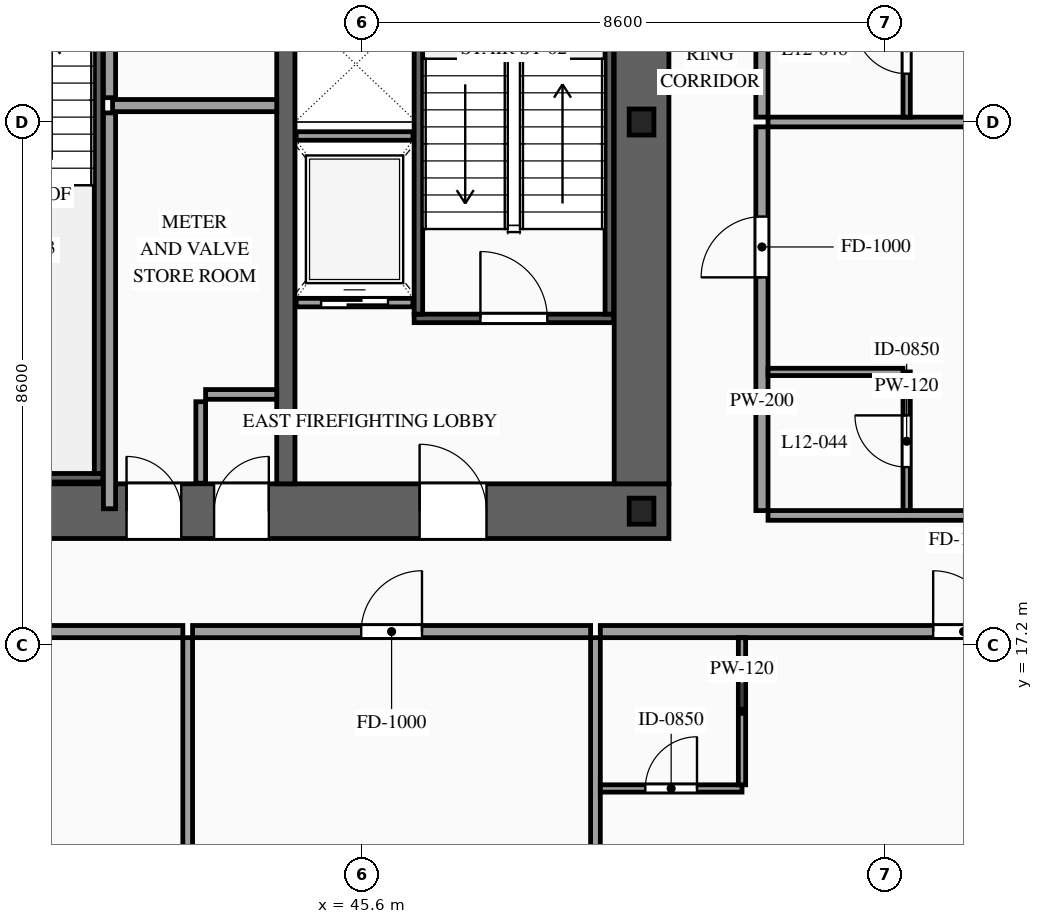
"""IFC4 building model, lengths in metres.
Left out: names, types, materials, properties, quantities, classifications, styles, units other than length and angle.
Written with IfcOpenShell. Run it as: python <this file> out.ifc"""

import sys

from ifc_helpers import new_model, si_unit, direction, frame, frame_2d, origin, origin_2d, place, context, subcontext, project, spatial, rectangle, i_section, extrude, source, transform, mapped, element, fill, save


model = new_model("IFC4")
c1 = context("Model", 3, precision=1e-05, world=origin(), true_north=direction((0.0, 1.0)))
c2 = subcontext(c1, "Body", "Model", "MODEL_VIEW")
j1 = project(units=[si_unit("LENGTHUNIT", "METRE"), si_unit("PLANEANGLEUNIT", "RADIAN")], contexts=[c1])
p1 = place(None, origin())
s1 = spatial("IfcSite", under=j1, at=p1, CompositionType="ELEMENT")
p2 = place(p1, origin())
s2 = spatial("IfcBuilding", under=s1, at=p2, CompositionType="ELEMENT")
p3 = place(p2, frame((0.0, 0.0, 49.6)))
s3 = spatial("IfcBuildingStorey", under=s2, at=p3, CompositionType="ELEMENT", Elevation=49.6)
p4 = place(p3, frame((23.35, 19.4, 0.0), z_axis=(0.0, 0.0, 1.0), x_axis=(1.0, 0.0, 0.0)))
e1 = element("IfcWall", 1, at=p4, inside=s3, PredefinedType="SHEAR", context=c2, shape_type="SweptSolid", body=[
    extrude(rectangle(XDim=27.3, YDim=0.9, at=frame_2d((13.65, 0.0))), origin(), (0.0, 0.0, 1.0), 3.6),
])
p5 = place(p4, frame((2.1, 0.0, 0.0)))
e2 = element("IfcOpeningElement", 2, at=p5, cuts=e1, PredefinedType="OPENING", context=c2, shape_type="SweptSolid", body=[
    extrude(rectangle(XDim=1.1, YDim=2.2, at=frame_2d((0.55, 1.1))), frame((0.0, 0.465, 0.0), z_axis=(0.0, -1.0, 0.0), x_axis=(1.0, 0.0, 0.0)), (0.0, 0.0, 1.0), 0.93),
])
p6 = place(p4, frame((10.0, 0.0, 0.0)))
e3 = element("IfcOpeningElement", 3, at=p6, cuts=e1, PredefinedType="OPENING", context=c2, shape_type="SweptSolid", body=[
    extrude(rectangle(XDim=1.1, YDim=2.2, at=frame_2d((0.55, 1.1))), frame((0.0, 0.465, 0.0), z_axis=(0.0, -1.0, 0.0), x_axis=(1.0, 0.0, 0.0)), (0.0, 0.0, 1.0), 0.93),
])
p7 = place(p4, frame((23.2, 0.0, 0.0)))
e4 = element("IfcOpeningElement", 4, at=p7, cuts=e1, PredefinedType="OPENING", context=c2, shape_type="SweptSolid", body=[
    extrude(rectangle(XDim=1.1, YDim=2.2, at=frame_2d((0.55, 1.1))), frame((0.0, 0.465, 0.0), z_axis=(0.0, -1.0, 0.0), x_axis=(1.0, 0.0, 0.0)), (0.0, 0.0, 1.0), 0.93),
])
p8 = place(p4, frame((19.82, 0.0, 0.0)))
e5 = element("IfcOpeningElement", 5, at=p8, cuts=e1, PredefinedType="OPENING", context=c2, shape_type="SweptSolid", body=[
    extrude(rectangle(XDim=0.9, YDim=2.15, at=frame_2d((0.45, 1.075))), frame((0.0, 0.465, 0.0), z_axis=(0.0, -1.0, 0.0), x_axis=(1.0, 0.0, 0.0)), (0.0, 0.0, 1.0), 0.93),
])
p9 = place(p4, frame((18.38, 0.0, 0.0)))
e6 = element("IfcOpeningElement", 6, at=p9, cuts=e1, PredefinedType="OPENING", context=c2, shape_type="SweptSolid", body=[
    extrude(rectangle(XDim=0.9, YDim=2.15, at=frame_2d((0.45, 1.075))), frame((0.0, 0.465, 0.0), z_axis=(0.0, -1.0, 0.0), x_axis=(1.0, 0.0, 0.0)), (0.0, 0.0, 1.0), 0.93),
])
m1 = source(origin(), c2, "Body", "SweptSolid", [
    extrude(rectangle(XDim=11.9, YDim=0.9, at=frame_2d((5.95, 0.0))), origin(), (0.0, 0.0, 1.0), 3.6),
])
p10 = place(p3, frame((50.2, 19.85, 0.0), z_axis=(0.0, 0.0, 1.0), x_axis=(0.0, 1.0, 0.0)))
e7 = element("IfcWall", 7, at=p10, inside=s3, PredefinedType="SHEAR", context=c2, shape_type="MappedRepresentation", body=[
    mapped(m1, transform((0.0, 0.0, 0.0), scale=1.0)),
])
m2 = source(origin(), c2, "Body", "SweptSolid", [
    extrude(rectangle(XDim=11.9, YDim=0.3, at=frame_2d((5.95, 0.0))), origin(), (0.0, 0.0, 1.0), 3.6),
])
p11 = place(p3, frame((44.35, 19.85, 0.0), z_axis=(0.0, 0.0, 1.0), x_axis=(0.0, 1.0, 0.0)))
e8 = element("IfcWall", 8, at=p11, inside=s3, PredefinedType="SOLIDWALL", context=c2, shape_type="MappedRepresentation", body=[
    mapped(m2, transform((0.0, 0.0, 0.0), scale=1.0)),
])
m3 = source(origin(), c2, "Body", "SweptSolid", [
    extrude(i_section(OverallWidth=0.407, OverallDepth=0.428, WebThickness=0.02, FlangeThickness=0.035, at=origin_2d()), origin(), (0.0, 0.0, 1.0), 3.6),
])
for number, where, z_axis, x_axis in (
    (9, (50.2, 19.4, 0.0), (0.0, 0.0, 1.0), (1.0, 0.0, 0.0)),
    (10, (50.2, 25.8, 0.0), (0.0, 0.0, 1.0), (1.0, 0.0, 0.0)),
):
    element("IfcColumn", number, at=place(p3, frame(where, z_axis=z_axis, x_axis=x_axis)), inside=s3, PredefinedType="COLUMN", context=c2, shape_type="MappedRepresentation", body=[
        mapped(m3, transform((0.0, 0.0, 0.0), scale=1.0)),
    ])
p12 = place(p3, frame((44.52, 22.83, 0.0), z_axis=(0.0, 0.0, 1.0), x_axis=(1.0, 0.0, 0.0)))
e11 = element("IfcWall", 11, at=p12, inside=s3, PredefinedType="SOLIDWALL", context=c2, shape_type="SweptSolid", body=[
    extrude(rectangle(XDim=1.92, YDim=0.14, at=frame_2d((0.96, 0.0))), origin(), (0.0, 0.0, 1.0), 3.38),
])
p13 = place(p12, frame((0.41, 0.0, 0.0)))
e12 = element("IfcOpeningElement", 12, at=p13, cuts=e11, PredefinedType="OPENING", context=c2, shape_type="SweptSolid", body=[
    extrude(rectangle(XDim=1.1, YDim=2.2, at=frame_2d((0.55, 1.1))), frame((0.0, 0.085, 0.0), z_axis=(0.0, -1.0, 0.0), x_axis=(1.0, 0.0, 0.0)), (0.0, 0.0, 1.0), 0.17),
])
m4 = source(origin(), c2, "Body", "SweptSolid", [
    extrude(rectangle(XDim=1.92, YDim=0.14, at=frame_2d((0.96, 0.0))), origin(), (0.0, 0.0, 1.0), 3.38),
])
p14 = place(p3, frame((44.52, 25.57, 0.0), z_axis=(0.0, 0.0, 1.0), x_axis=(1.0, 0.0, 0.0)))
e13 = element("IfcWall", 13, at=p14, inside=s3, PredefinedType="SOLIDWALL", context=c2, shape_type="MappedRepresentation", body=[
    mapped(m4, transform((0.0, 0.0, 0.0), scale=1.0)),
])
p15 = place(p3, frame((46.46, 22.57, 0.0), z_axis=(0.0, 0.0, 1.0), x_axis=(1.0, 0.0, 0.0)))
e14 = element("IfcWall", 14, at=p15, inside=s3, PredefinedType="SOLIDWALL", context=c2, shape_type="SweptSolid", body=[
    extrude(rectangle(XDim=3.28, YDim=0.14, at=frame_2d((1.64, 0.0))), origin(), (0.0, 0.0, 1.0), 3.38),
])
p16 = place(p15, frame((1.09, 0.0, 0.0)))
e15 = element("IfcOpeningElement", 15, at=p16, cuts=e14, PredefinedType="OPENING", context=c2, shape_type="SweptSolid", body=[
    extrude(rectangle(XDim=1.1, YDim=2.2, at=frame_2d((0.55, 1.1))), frame((0.0, 0.085, 0.0), z_axis=(0.0, -1.0, 0.0), x_axis=(1.0, 0.0, 0.0)), (0.0, 0.0, 1.0), 0.17),
])
m5 = source(origin(), c2, "Body", "SweptSolid", [
    extrude(rectangle(XDim=8.94, YDim=0.14, at=frame_2d((4.47, 0.0))), origin(), (0.0, 0.0, 1.0), 3.38),
])
for number, where, z_axis, x_axis in (
    (16, (46.53, 22.64, 0.0), (0.0, 0.0, 1.0), (0.0, 1.0, 0.0)),
    (17, (49.67, 22.64, 0.0), (0.0, 0.0, 1.0), (0.0, 1.0, 0.0)),
):
    element("IfcWall", number, at=place(p3, frame(where, z_axis=z_axis, x_axis=x_axis)), inside=s3, PredefinedType="SOLIDWALL", context=c2, shape_type="MappedRepresentation", body=[
        mapped(m5, transform((0.0, 0.0, 0.0), scale=1.0)),
    ])
m6 = source(origin(), c2, "Body", "SweptSolid", [
    extrude(rectangle(XDim=3.14, YDim=0.14, at=frame_2d((1.57, 0.0))), origin(), (0.0, 0.0, 1.0), 3.38),
])
p17 = place(p3, frame((38.2, 19.95, 0.0), z_axis=(0.0, 0.0, 1.0), x_axis=(1.0, 0.0, 0.0)))
e18 = element("IfcWall", 18, at=p17, inside=s3, PredefinedType="SOLIDWALL", context=c2, shape_type="MappedRepresentation", body=[
    mapped(m6, transform((0.0, 0.0, 0.0), scale=1.0)),
])
m7 = source(origin(), c2, "Body", "SweptSolid", [
    extrude(rectangle(XDim=8.94, YDim=0.14, at=frame_2d((4.47, 0.0))), origin(), (0.0, 0.0, 1.0), 3.38),
])
p18 = place(p3, frame((41.27, 20.02, 0.0), z_axis=(0.0, 0.0, 1.0), x_axis=(0.0, 1.0, 0.0)))
e19 = element("IfcWall", 19, at=p18, inside=s3, PredefinedType="SOLIDWALL", context=c2, shape_type="MappedRepresentation", body=[
    mapped(m7, transform((0.0, 0.0, 0.0), scale=1.0)),
])
m8 = source(origin(), c2, "Body", "SweptSolid", [
    extrude(rectangle(XDim=1.34, YDim=0.16, at=frame_2d((0.67, 0.0))), origin(), (0.0, 0.0, 1.0), 3.38),
])
p19 = place(p3, frame((42.95, 19.86, 0.0), z_axis=(0.0, 0.0, 1.0), x_axis=(0.0, 1.0, 0.0)))
e20 = element("IfcWall", 20, at=p19, inside=s3, PredefinedType="PARTITIONING", context=c2, shape_type="MappedRepresentation", body=[
    mapped(m8, transform((0.0, 0.0, 0.0), scale=1.0)),
])
m9 = source(origin(), c2, "Body", "SweptSolid", [
    extrude(rectangle(XDim=1.17, YDim=0.16, at=frame_2d((0.585, 0.0))), origin(), (0.0, 0.0, 1.0), 3.38),
])
p20 = place(p3, frame((43.03, 21.32, 0.0), z_axis=(0.0, 0.0, 1.0), x_axis=(1.0, 0.0, 0.0)))
e21 = element("IfcWall", 21, at=p20, inside=s3, PredefinedType="PARTITIONING", context=c2, shape_type="MappedRepresentation", body=[
    mapped(m9, transform((0.0, 0.0, 0.0), scale=1.0)),
])
m10 = source(origin(), c2, "Body", "SweptSolid", [
    extrude(rectangle(XDim=6.51, YDim=0.2, at=frame_2d((3.255, 0.0))), origin(), (0.0, 0.0, 1.0), 3.38),
])
p21 = place(p3, frame((41.45, 19.44, 0.0), z_axis=(0.0, 0.0, 1.0), x_axis=(0.0, 1.0, 0.0)))
e22 = element("IfcWall", 22, at=p21, inside=s3, PredefinedType="PARTITIONING", context=c2, shape_type="MappedRepresentation", body=[
    mapped(m10, transform((0.0, 0.0, 0.0), scale=1.0)),
])
m11 = source(origin(), c2, "Body", "SweptSolid", [
    extrude(rectangle(XDim=2.7, YDim=0.2, at=frame_2d((1.35, 0.0))), origin(), (0.0, 0.0, 1.0), 3.38),
])
p22 = place(p3, frame((41.5, 26.07, 0.0), z_axis=(0.0, 0.0, 1.0), x_axis=(1.0, 0.0, 0.0)))
e23 = element("IfcWall", 23, at=p22, inside=s3, PredefinedType="PARTITIONING", context=c2, shape_type="MappedRepresentation", body=[
    mapped(m11, transform((0.0, 0.0, 0.0), scale=1.0)),
])
m12 = source(origin(), c2, "Body", "SweptSolid", [
    extrude(rectangle(XDim=5.96, YDim=0.2, at=frame_2d((2.98, 0.0))), origin(), (0.0, 0.0, 1.0), 3.38),
])
p23 = place(p3, frame((41.45, 26.2, 0.0), z_axis=(0.0, 0.0, 1.0), x_axis=(0.0, 1.0, 0.0)))
e24 = element("IfcWall", 24, at=p23, inside=s3, PredefinedType="PARTITIONING", context=c2, shape_type="MappedRepresentation", body=[
    mapped(m12, transform((0.0, 0.0, 0.0), scale=1.0)),
])
p24 = place(p3, frame((31.874, 17.42, 0.0), z_axis=(0.0, 0.0, 1.0), x_axis=(1.0, 0.0, 0.0)))
e25 = element("IfcWall", 25, at=p24, inside=s3, PredefinedType="PARTITIONING", context=c2, shape_type="SweptSolid", body=[
    extrude(rectangle(XDim=10.782, YDim=0.2, at=frame_2d((5.391, 0.0))), origin(), (0.0, 0.0, 1.0), 3.38),
])
p25 = place(p24, frame((4.891, 0.0, 0.0)))
e26 = element("IfcOpeningElement", 26, at=p25, cuts=e25, PredefinedType="OPENING", context=c2, shape_type="SweptSolid", body=[
    extrude(rectangle(XDim=1.0, YDim=2.2, at=frame_2d((0.5, 1.1))), frame((0.0, 0.115, 0.0), z_axis=(0.0, -1.0, 0.0), x_axis=(1.0, 0.0, 0.0)), (0.0, 0.0, 1.0), 0.23),
])
m13 = source(origin(), c2, "Body", "SweptSolid", [
    extrude(rectangle(XDim=16.47, YDim=0.16, at=frame_2d((8.235, 0.0))), origin(), (0.0, 0.0, 1.0), 3.38),
])
p26 = place(p3, frame((42.736, 0.85, 0.0), z_axis=(0.0, 0.0, 1.0), x_axis=(0.0, 1.0, 0.0)))
e27 = element("IfcWall", 27, at=p26, inside=s3, PredefinedType="PARTITIONING", context=c2, shape_type="MappedRepresentation", body=[
    mapped(m13, transform((0.0, 0.0, 0.0), scale=1.0)),
])
p27 = place(p3, frame((42.816, 17.42, 0.0), z_axis=(0.0, 0.0, 1.0), x_axis=(1.0, 0.0, 0.0)))
e28 = element("IfcWall", 28, at=p27, inside=s3, PredefinedType="PARTITIONING", context=c2, shape_type="SweptSolid", body=[
    extrude(rectangle(XDim=6.546, YDim=0.2, at=frame_2d((3.273, 0.0))), origin(), (0.0, 0.0, 1.0), 3.38),
])
p28 = place(p27, frame((2.773, 0.0, 0.0)))
e29 = element("IfcOpeningElement", 29, at=p28, cuts=e28, PredefinedType="OPENING", context=c2, shape_type="SweptSolid", body=[
    extrude(rectangle(XDim=1.0, YDim=2.2, at=frame_2d((0.5, 1.1))), frame((0.0, 0.115, 0.0), z_axis=(0.0, -1.0, 0.0), x_axis=(1.0, 0.0, 0.0)), (0.0, 0.0, 1.0), 0.23),
])
p29 = place(p3, frame((49.442, 0.85, 0.0), z_axis=(0.0, 0.0, 1.0), x_axis=(0.0, 1.0, 0.0)))
e30 = element("IfcWall", 30, at=p29, inside=s3, PredefinedType="PARTITIONING", context=c2, shape_type="MappedRepresentation", body=[
    mapped(m13, transform((0.0, 0.0, 0.0), scale=1.0)),
])
p30 = place(p3, frame((49.522, 17.42, 0.0), z_axis=(0.0, 0.0, 1.0), x_axis=(1.0, 0.0, 0.0)))
e31 = element("IfcWall", 31, at=p30, inside=s3, PredefinedType="PARTITIONING", context=c2, shape_type="SweptSolid", body=[
    extrude(rectangle(XDim=9.538, YDim=0.2, at=frame_2d((4.769, 0.0))), origin(), (0.0, 0.0, 1.0), 3.38),
])
p31 = place(p30, frame((5.474, 0.0, 0.0)))
e32 = element("IfcOpeningElement", 32, at=p31, cuts=e31, PredefinedType="OPENING", context=c2, shape_type="SweptSolid", body=[
    extrude(rectangle(XDim=1.0, YDim=2.2, at=frame_2d((0.5, 1.1))), frame((0.0, 0.115, 0.0), z_axis=(0.0, -1.0, 0.0), x_axis=(1.0, 0.0, 0.0)), (0.0, 0.0, 1.0), 0.23),
])
p32 = place(p3, frame((49.522, 14.84, 0.0), z_axis=(0.0, 0.0, 1.0), x_axis=(1.0, 0.0, 0.0)))
e33 = element("IfcWall", 33, at=p32, inside=s3, PredefinedType="PARTITIONING", context=c2, shape_type="SweptSolid", body=[
    extrude(rectangle(XDim=2.33, YDim=0.12, at=frame_2d((1.165, 0.0))), origin(), (0.0, 0.0, 1.0), 3.38),
])
p33 = place(p32, frame((0.74, 0.0, 0.0)))
e34 = element("IfcOpeningElement", 34, at=p33, cuts=e33, PredefinedType="OPENING", context=c2, shape_type="SweptSolid", body=[
    extrude(rectangle(XDim=0.85, YDim=2.1, at=frame_2d((0.425, 1.05))), frame((0.0, 0.075, 0.0), z_axis=(0.0, -1.0, 0.0), x_axis=(1.0, 0.0, 0.0)), (0.0, 0.0, 1.0), 0.15),
])
m14 = source(origin(), c2, "Body", "SweptSolid", [
    extrude(rectangle(XDim=2.42, YDim=0.12, at=frame_2d((1.21, 0.0))), origin(), (0.0, 0.0, 1.0), 3.38),
])
p34 = place(p3, frame((51.852, 14.9, 0.0), z_axis=(0.0, 0.0, 1.0), x_axis=(0.0, 1.0, 0.0)))
e35 = element("IfcWall", 35, at=p34, inside=s3, PredefinedType="PARTITIONING", context=c2, shape_type="MappedRepresentation", body=[
    mapped(m14, transform((0.0, 0.0, 0.0), scale=1.0)),
])
p35 = place(p3, frame((52.18, 19.41, 0.0), z_axis=(0.0, 0.0, 1.0), x_axis=(0.0, 1.0, 0.0)))
e36 = element("IfcWall", 36, at=p35, inside=s3, PredefinedType="PARTITIONING", context=c2, shape_type="SweptSolid", body=[
    extrude(rectangle(XDim=6.31, YDim=0.2, at=frame_2d((3.155, 0.0))), origin(), (0.0, 0.0, 1.0), 3.38),
])
p36 = place(p35, frame((3.835, 0.0, 0.0)))
e37 = element("IfcOpeningElement", 37, at=p36, cuts=e36, PredefinedType="OPENING", context=c2, shape_type="SweptSolid", body=[
    extrude(rectangle(XDim=1.0, YDim=2.2, at=frame_2d((0.5, 1.1))), frame((0.0, 0.115, 0.0), z_axis=(0.0, -1.0, 0.0), x_axis=(1.0, 0.0, 0.0)), (0.0, 0.0, 1.0), 0.23),
])
m15 = source(origin(), c2, "Body", "SweptSolid", [
    extrude(rectangle(XDim=9.67, YDim=0.16, at=frame_2d((4.835, 0.0))), origin(), (0.0, 0.0, 1.0), 2.575),
])
p37 = place(p3, frame((52.28, 25.8, 0.0), z_axis=(0.0, 0.0, 1.0), x_axis=(1.0, 0.0, 0.0)))
e38 = element("IfcWall", 38, at=p37, inside=s3, PredefinedType="PARTITIONING", context=c2, shape_type="MappedRepresentation", body=[
    mapped(m15, transform((0.0, 0.0, 0.0), scale=1.0)),
])
m16 = source(origin(), c2, "Body", "SweptSolid", [
    extrude(rectangle(XDim=9.67, YDim=0.16, at=frame_2d((4.835, 0.0))), origin(), (0.0, 0.0, 1.0), 2.875),
])
p38 = place(p3, frame((52.28, 19.33, 0.0), z_axis=(0.0, 0.0, 1.0), x_axis=(1.0, 0.0, 0.0)))
e39 = element("IfcWall", 39, at=p38, inside=s3, PredefinedType="PARTITIONING", context=c2, shape_type="MappedRepresentation", body=[
    mapped(m16, transform((0.0, 0.0, 0.0), scale=1.0)),
])
p39 = place(p3, frame((54.56, 19.41, 0.0), z_axis=(0.0, 0.0, 1.0), x_axis=(0.0, 1.0, 0.0)))
e40 = element("IfcWall", 40, at=p39, inside=s3, PredefinedType="PARTITIONING", context=c2, shape_type="SweptSolid", body=[
    extrude(rectangle(XDim=2.28, YDim=0.12, at=frame_2d((1.14, 0.0))), origin(), (0.0, 0.0, 1.0), 3.38),
])
p40 = place(p39, frame((0.715, 0.0, 0.0)))
e41 = element("IfcOpeningElement", 41, at=p40, cuts=e40, PredefinedType="OPENING", context=c2, shape_type="SweptSolid", body=[
    extrude(rectangle(XDim=0.85, YDim=2.1, at=frame_2d((0.425, 1.05))), frame((0.0, 0.075, 0.0), z_axis=(0.0, -1.0, 0.0), x_axis=(1.0, 0.0, 0.0)), (0.0, 0.0, 1.0), 0.15),
])
m17 = source(origin(), c2, "Body", "SweptSolid", [
    extrude(rectangle(XDim=2.22, YDim=0.12, at=frame_2d((1.11, 0.0))), origin(), (0.0, 0.0, 1.0), 3.38),
])
p41 = place(p3, frame((52.28, 21.69, 0.0), z_axis=(0.0, 0.0, 1.0), x_axis=(1.0, 0.0, 0.0)))
e42 = element("IfcWall", 42, at=p41, inside=s3, PredefinedType="PARTITIONING", context=c2, shape_type="MappedRepresentation", body=[
    mapped(m17, transform((0.0, 0.0, 0.0), scale=1.0)),
])
p42 = place(p3, frame((52.18, 25.88, 0.0), z_axis=(0.0, 0.0, 1.0), x_axis=(0.0, 1.0, 0.0)))
e43 = element("IfcWall", 43, at=p42, inside=s3, PredefinedType="PARTITIONING", context=c2, shape_type="SweptSolid", body=[
    extrude(rectangle(XDim=6.31, YDim=0.2, at=frame_2d((3.155, 0.0))), origin(), (0.0, 0.0, 1.0), 3.38),
])
p43 = place(p42, frame((3.835, 0.0, 0.0)))
e44 = element("IfcOpeningElement", 44, at=p43, cuts=e43, PredefinedType="OPENING", context=c2, shape_type="SweptSolid", body=[
    extrude(rectangle(XDim=1.0, YDim=2.2, at=frame_2d((0.5, 1.1))), frame((0.0, 0.115, 0.0), z_axis=(0.0, -1.0, 0.0), x_axis=(1.0, 0.0, 0.0)), (0.0, 0.0, 1.0), 0.23),
])
p44 = place(p3, frame((54.56, 25.88, 0.0), z_axis=(0.0, 0.0, 1.0), x_axis=(0.0, 1.0, 0.0)))
e45 = element("IfcWall", 45, at=p44, inside=s3, PredefinedType="PARTITIONING", context=c2, shape_type="SweptSolid", body=[
    extrude(rectangle(XDim=2.28, YDim=0.12, at=frame_2d((1.14, 0.0))), origin(), (0.0, 0.0, 1.0), 3.38),
])
p45 = place(p44, frame((0.715, 0.0, 0.0)))
e46 = element("IfcOpeningElement", 46, at=p45, cuts=e45, PredefinedType="OPENING", context=c2, shape_type="SweptSolid", body=[
    extrude(rectangle(XDim=0.85, YDim=2.1, at=frame_2d((0.425, 1.05))), frame((0.0, 0.075, 0.0), z_axis=(0.0, -1.0, 0.0), x_axis=(1.0, 0.0, 0.0)), (0.0, 0.0, 1.0), 0.15),
])
m18 = source(origin(), c2, "Body", "SweptSolid", [
    extrude(rectangle(XDim=1.1, YDim=2.2, at=frame_2d((0.55, 1.1))), frame((0.0, 0.025, 0.0), z_axis=(0.0, -1.0, 0.0), x_axis=(1.0, 0.0, 0.0)), (0.0, 0.0, 1.0), 0.05),
])
p46 = place(p13, origin())
e47 = element("IfcDoor", 47, at=p46, inside=s3, OperationType="SLIDING_TO_RIGHT", PredefinedType="DOOR", context=c2, shape_type="MappedRepresentation", body=[
    mapped(m18, transform((0.0, 0.0, 0.0), scale=1.0)),
])
fill(e12, e47)
m19 = source(origin(), c2, "Body", "SweptSolid", [
    extrude(rectangle(XDim=1.1, YDim=2.2, at=frame_2d((0.55, 1.1))), frame((0.0, 0.025, 0.0), z_axis=(0.0, -1.0, 0.0), x_axis=(1.0, 0.0, 0.0)), (0.0, 0.0, 1.0), 0.05),
])
p47 = place(p16, origin())
e48 = element("IfcDoor", 48, at=p47, inside=s3, OperationType="SINGLE_SWING_LEFT", PredefinedType="DOOR", context=c2, shape_type="MappedRepresentation", body=[
    mapped(m19, transform((0.0, 0.0, 0.0), scale=1.0)),
])
fill(e15, e48)
p48 = place(p7, origin())
e49 = element("IfcDoor", 49, at=p48, inside=s3, OperationType="SINGLE_SWING_LEFT", PredefinedType="DOOR", context=c2, shape_type="MappedRepresentation", body=[
    mapped(m19, transform((0.0, 0.0, 0.0), scale=1.0)),
])
fill(e4, e49)
m20 = source(origin(), c2, "Body", "SweptSolid", [
    extrude(rectangle(XDim=0.9, YDim=2.15, at=frame_2d((0.45, 1.075))), frame((0.0, 0.025, 0.0), z_axis=(0.0, -1.0, 0.0), x_axis=(1.0, 0.0, 0.0)), (0.0, 0.0, 1.0), 0.05),
])
p49 = place(p8, origin())
e50 = element("IfcDoor", 50, at=p49, inside=s3, OperationType="SINGLE_SWING_RIGHT", PredefinedType="DOOR", context=c2, shape_type="MappedRepresentation", body=[
    mapped(m20, transform((0.0, 0.0, 0.0), scale=1.0)),
])
fill(e5, e50)
p50 = place(p9, origin())
e51 = element("IfcDoor", 51, at=p50, inside=s3, OperationType="SINGLE_SWING_LEFT", PredefinedType="DOOR", context=c2, shape_type="MappedRepresentation", body=[
    mapped(m20, transform((0.0, 0.0, 0.0), scale=1.0)),
])
fill(e6, e51)
m21 = source(origin(), c2, "Body", "SweptSolid", [
    extrude(rectangle(XDim=1.0, YDim=2.2, at=frame_2d((0.5, 1.1))), frame((0.0, 0.025, 0.0), z_axis=(0.0, -1.0, 0.0), x_axis=(1.0, 0.0, 0.0)), (0.0, 0.0, 1.0), 0.05),
])
p51 = place(p28, origin())
e52 = element("IfcDoor", 52, at=p51, inside=s3, OperationType="SINGLE_SWING_RIGHT", PredefinedType="DOOR", context=c2, shape_type="MappedRepresentation", body=[
    mapped(m21, transform((0.0, 0.0, 0.0), scale=1.0)),
])
fill(e29, e52)
p52 = place(p31, origin())
e53 = element("IfcDoor", 53, at=p52, inside=s3, OperationType="SINGLE_SWING_LEFT", PredefinedType="DOOR", context=c2, shape_type="MappedRepresentation", body=[
    mapped(m21, transform((0.0, 0.0, 0.0), scale=1.0)),
])
fill(e32, e53)
m22 = source(origin(), c2, "Body", "SweptSolid", [
    extrude(rectangle(XDim=0.85, YDim=2.1, at=frame_2d((0.425, 1.05))), frame((0.0, 0.025, 0.0), z_axis=(0.0, -1.0, 0.0), x_axis=(1.0, 0.0, 0.0)), (0.0, 0.0, 1.0), 0.05),
])
p53 = place(p33, origin())
e54 = element("IfcDoor", 54, at=p53, inside=s3, OperationType="SINGLE_SWING_RIGHT", PredefinedType="DOOR", context=c2, shape_type="MappedRepresentation", body=[
    mapped(m22, transform((0.0, 0.0, 0.0), scale=1.0)),
])
fill(e34, e54)
p54 = place(p36, origin())
e55 = element("IfcDoor", 55, at=p54, inside=s3, OperationType="SINGLE_SWING_LEFT", PredefinedType="DOOR", context=c2, shape_type="MappedRepresentation", body=[
    mapped(m21, transform((0.0, 0.0, 0.0), scale=1.0)),
])
fill(e37, e55)
p55 = place(p40, origin())
e56 = element("IfcDoor", 56, at=p55, inside=s3, OperationType="SINGLE_SWING_RIGHT", PredefinedType="DOOR", context=c2, shape_type="MappedRepresentation", body=[
    mapped(m22, transform((0.0, 0.0, 0.0), scale=1.0)),
])
fill(e41, e56)
p56 = place(p45, origin())
e57 = element("IfcDoor", 57, at=p56, inside=s3, OperationType="SINGLE_SWING_RIGHT", PredefinedType="DOOR", context=c2, shape_type="MappedRepresentation", body=[
    mapped(m22, transform((0.0, 0.0, 0.0), scale=1.0)),
])
fill(e46, e57)
save(model, sys.argv[1])
